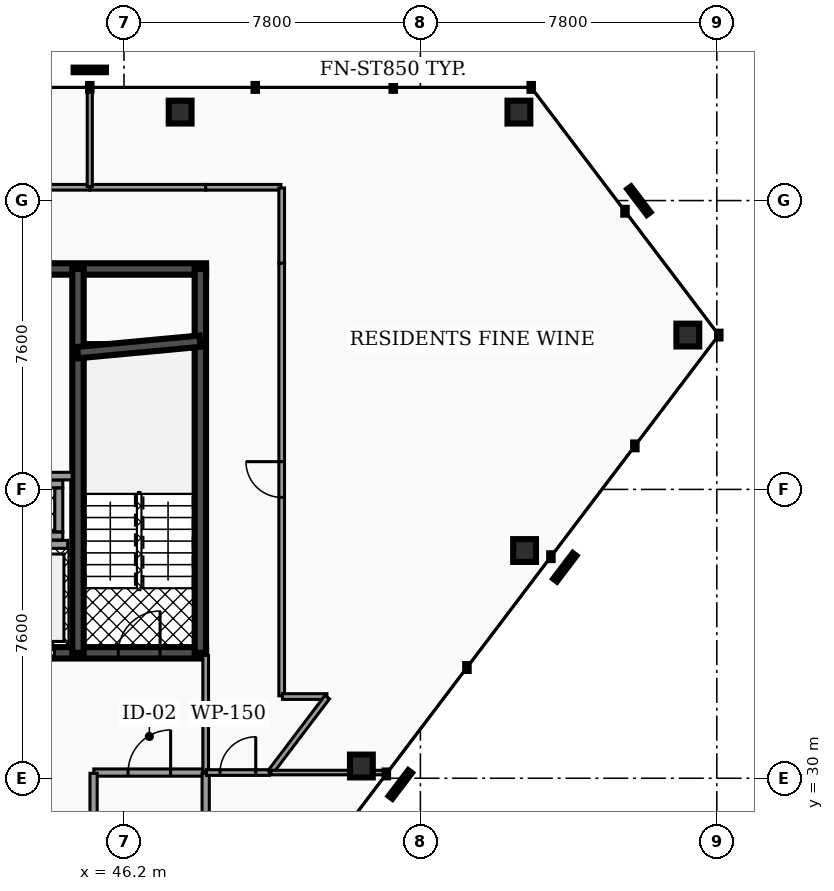
"""IFC4 building model, lengths in metres.
Left out: names, types, materials, properties, quantities, classifications, styles, units other than length and angle.
Written with IfcOpenShell. Run it as: python <this file> out.ifc"""

import sys

from ifc_helpers import new_model, si_unit, direction, frame, frame_2d, origin, origin_2d, place, context, subcontext, project, spatial, rectangle, hollow_rectangle, extrude, element, fill, save


model = new_model("IFC4")
c1 = context("Model", 3, precision=1e-05, world=origin(), true_north=direction((0.0, 1.0)))
c2 = subcontext(c1, "Body", "Model", "MODEL_VIEW")
j1 = project(units=[si_unit("LENGTHUNIT", "METRE"), si_unit("PLANEANGLEUNIT", "RADIAN")], contexts=[c1])
p1 = place(None, origin())
s1 = spatial("IfcSite", under=j1, at=p1, CompositionType="ELEMENT")
p2 = place(p1, origin())
s2 = spatial("IfcBuilding", under=s1, at=p2, CompositionType="ELEMENT")
p3 = place(p2, frame((0.0, 0.0, 229.16)))
s3 = spatial("IfcBuildingStorey", under=s2, at=p3, CompositionType="ELEMENT", Elevation=229.16)
p4 = place(p3, frame((28.5, 43.4, 0.0), z_axis=(0.0, 0.0, 1.0), x_axis=(1.0, 0.0, 0.0)))
e1 = element("IfcWall", 1, at=p4, inside=s3, PredefinedType="SHEAR", context=c2, shape_type="SweptSolid", body=[
    extrude(rectangle(XDim=19.86, YDim=0.3, at=frame_2d((9.93, 0.0))), origin(), (0.0, 0.0, 1.0), 3.18),
])
p5 = place(p3, frame((28.5, 33.3, 0.0), z_axis=(0.0, 0.0, 1.0), x_axis=(1.0, 0.0, 0.0)))
e2 = element("IfcWall", 2, at=p5, inside=s3, PredefinedType="SHEAR", context=c2, shape_type="SweptSolid", body=[
    extrude(rectangle(XDim=19.86, YDim=0.3, at=frame_2d((9.93, 0.0))), origin(), (0.0, 0.0, 1.0), 3.18),
])
p6 = place(p5, frame((3.93, 0.0, 0.0)))
e3 = element("IfcOpeningElement", 3, at=p6, cuts=e2, PredefinedType="OPENING", context=c2, shape_type="SweptSolid", body=[
    extrude(rectangle(XDim=1.1, YDim=2.15, at=frame_2d((0.55, 1.075))), frame((0.0, 0.16, 0.0), z_axis=(0.0, -1.0, 0.0), x_axis=(1.0, 0.0, 0.0)), (0.0, 0.0, 1.0), 0.32),
])
p7 = place(p5, frame((14.77, 0.0, 0.0)))
e4 = element("IfcOpeningElement", 4, at=p7, cuts=e2, PredefinedType="OPENING", context=c2, shape_type="SweptSolid", body=[
    extrude(rectangle(XDim=1.1, YDim=2.15, at=frame_2d((0.55, 1.075))), frame((0.0, 0.16, 0.0), z_axis=(0.0, -1.0, 0.0), x_axis=(1.0, 0.0, 0.0)), (0.0, 0.0, 1.0), 0.32),
])
p8 = place(p5, frame((11.25, 0.0, 0.0)))
e5 = element("IfcOpeningElement", 5, at=p8, cuts=e2, PredefinedType="OPENING", context=c2, shape_type="SweptSolid", body=[
    extrude(rectangle(XDim=1.0, YDim=2.1, at=frame_2d((0.5, 1.05))), frame((0.0, 0.16, 0.0), z_axis=(0.0, -1.0, 0.0), x_axis=(1.0, 0.0, 0.0)), (0.0, 0.0, 1.0), 0.32),
])
p9 = place(p5, frame((12.95, 0.0, 0.0)))
e6 = element("IfcOpeningElement", 6, at=p9, cuts=e2, PredefinedType="OPENING", context=c2, shape_type="SweptSolid", body=[
    extrude(rectangle(XDim=1.0, YDim=2.1, at=frame_2d((0.5, 1.05))), frame((0.0, 0.16, 0.0), z_axis=(0.0, -1.0, 0.0), x_axis=(1.0, 0.0, 0.0)), (0.0, 0.0, 1.0), 0.32),
])
p10 = place(p5, frame((5.85, 0.0, 0.0)))
e7 = element("IfcOpeningElement", 7, at=p10, cuts=e2, PredefinedType="OPENING", context=c2, shape_type="SweptSolid", body=[
    extrude(rectangle(XDim=1.0, YDim=2.1, at=frame_2d((0.5, 1.05))), frame((0.0, 0.16, 0.0), z_axis=(0.0, -1.0, 0.0), x_axis=(1.0, 0.0, 0.0)), (0.0, 0.0, 1.0), 0.32),
])
p11 = place(p5, frame((1.21, 0.0, 0.0)))
e8 = element("IfcOpeningElement", 8, at=p11, cuts=e2, PredefinedType="OPENING", context=c2, shape_type="SweptSolid", body=[
    extrude(rectangle(XDim=1.1, YDim=2.2, at=frame_2d((0.55, 1.1))), frame((0.0, 0.16, 0.0), z_axis=(0.0, -1.0, 0.0), x_axis=(1.0, 0.0, 0.0)), (0.0, 0.0, 1.0), 0.32),
])
p12 = place(p5, frame((9.34, 0.0, 0.0)))
e9 = element("IfcOpeningElement", 9, at=p12, cuts=e2, PredefinedType="OPENING", context=c2, shape_type="SweptSolid", body=[
    extrude(rectangle(XDim=1.12, YDim=2.05, at=frame_2d((0.56, 1.025))), frame((0.0, 0.16, 0.0), z_axis=(0.0, -1.0, 0.0), x_axis=(1.0, 0.0, 0.0)), (0.0, 0.0, 1.0), 0.32),
])
p13 = place(p5, frame((17.55, 0.0, 0.0)))
e10 = element("IfcOpeningElement", 10, at=p13, cuts=e2, PredefinedType="OPENING", context=c2, shape_type="SweptSolid", body=[
    extrude(rectangle(XDim=1.1, YDim=2.2, at=frame_2d((0.55, 1.1))), frame((0.0, 0.16, 0.0), z_axis=(0.0, -1.0, 0.0), x_axis=(1.0, 0.0, 0.0)), (0.0, 0.0, 1.0), 0.32),
])
for number, where, z_axis, x_axis in (
    (11, (44.99, 33.3, 0.0), (0.0, 0.0, 1.0), (0.0, 1.0, 0.0)),
    (12, (48.21, 33.3, 0.0), (0.0, 0.0, 1.0), (0.0, 1.0, 0.0)),
):
    element("IfcWall", number, at=place(p3, frame(where, z_axis=z_axis, x_axis=x_axis)), inside=s3, PredefinedType="SHEAR", context=c2, shape_type="SweptSolid", body=[
        extrude(rectangle(XDim=10.1, YDim=0.3, at=frame_2d((5.05, 0.0))), origin(), (0.0, 0.0, 1.0), 3.18),
    ])
p14 = place(p3, frame((44.98, 41.2, 0.0), z_axis=(0.0, 0.0, 1.0), x_axis=(0.995686468965, 0.09278176286, 0.0)))
e13 = element("IfcWall", 13, at=p14, inside=s3, PredefinedType="SHEAR", context=c2, shape_type="SweptSolid", body=[
    extrude(rectangle(XDim=3.234, YDim=0.3, at=frame_2d((1.617, 0.0))), origin(), (0.0, 0.0, 1.0), 3.18),
])
for number, where, z_axis, x_axis in (
    (14, (56.592, 47.528, 0.0), (0.0, 0.0, 1.0), (1.0, 0.0, 0.0)),
    (15, (47.678, 47.528, 0.0), (0.0, 0.0, 1.0), (1.0, 0.0, 0.0)),
    (16, (52.447, 30.323, 0.0), (0.0, 0.0, 1.0), (1.0, 0.0, 0.0)),
    (17, (56.742, 35.992, 0.0), (0.0, 0.0, 1.0), (1.0, 0.0, 0.0)),
    (18, (61.037, 41.661, 0.0), (0.0, 0.0, 1.0), (1.0, 0.0, 0.0)),
):
    element("IfcColumn", number, at=place(p3, frame(where, z_axis=z_axis, x_axis=x_axis)), inside=s3, PredefinedType="COLUMN", context=c2, shape_type="SweptSolid", body=[
        extrude(hollow_rectangle(XDim=0.6, YDim=0.6, WallThickness=0.03, at=origin_2d()), origin(), (0.0, 0.0, 1.0), 3.18),
    ])
p15 = place(p3, frame((42.92, 36.155, 0.0), z_axis=(0.0, 0.0, 1.0), x_axis=(1.0, 0.0, 0.0)))
e19 = element("IfcWall", 19, at=p15, inside=s3, PredefinedType="SOLIDWALL", context=c2, shape_type="SweptSolid", body=[
    extrude(rectangle(XDim=1.8, YDim=0.21, at=frame_2d((0.9, 0.0))), origin(), (0.0, 0.0, 1.0), 3.18),
])
for number, where, z_axis, x_axis in (
    (20, (42.99, 36.375, 0.0), (0.0, 0.0, 1.0), (1.0, 0.0, 0.0)),
    (21, (42.99, 37.745, 0.0), (0.0, 0.0, 1.0), (1.0, 0.0, 0.0)),
):
    element("IfcWall", number, at=place(p3, frame(where, z_axis=z_axis, x_axis=x_axis)), inside=s3, PredefinedType="SOLIDWALL", context=c2, shape_type="SweptSolid", body=[
        extrude(rectangle(XDim=1.6, YDim=0.21, at=frame_2d((0.8, 0.0))), origin(), (0.0, 0.0, 1.0), 3.18),
    ])
p16 = place(p3, frame((44.485, 36.485, 0.0), z_axis=(0.0, 0.0, 1.0), x_axis=(0.0, 1.0, 0.0)))
e22 = element("IfcWall", 22, at=p16, inside=s3, PredefinedType="SOLIDWALL", context=c2, shape_type="SweptSolid", body=[
    extrude(rectangle(XDim=1.15, YDim=0.21, at=frame_2d((0.575, 0.0))), origin(), (0.0, 0.0, 1.0), 3.18),
])
p17 = place(p3, frame((41.22, 37.95, 0.0), z_axis=(0.0, 0.0, 1.0), x_axis=(1.0, 0.0, 0.0)))
e23 = element("IfcWall", 23, at=p17, inside=s3, PredefinedType="PARTITIONING", context=c2, shape_type="SweptSolid", body=[
    extrude(rectangle(XDim=3.615, YDim=0.2, at=frame_2d((1.808, 0.0))), origin(), (0.0, 0.0, 1.0), 2.235),
])
p18 = place(p3, frame((45.405, 30.15, 0.0), z_axis=(0.0, 0.0, 1.0), x_axis=(1.0, 0.0, 0.0)))
e24 = element("IfcWall", 24, at=p18, inside=s3, PredefinedType="PARTITIONING", context=c2, shape_type="SweptSolid", body=[
    extrude(rectangle(XDim=2.925, YDim=0.19, at=frame_2d((1.462, 0.0))), origin(), (0.0, 0.0, 1.0), 2.235),
])
p19 = place(p18, frame((0.903, 0.0, 0.0)))
e25 = element("IfcOpeningElement", 25, at=p19, cuts=e24, PredefinedType="OPENING", context=c2, shape_type="SweptSolid", body=[
    extrude(rectangle(XDim=1.12, YDim=2.05, at=frame_2d((0.56, 1.025))), frame((0.0, 0.105, 0.0), z_axis=(0.0, -1.0, 0.0), x_axis=(1.0, 0.0, 0.0)), (0.0, 0.0, 1.0), 0.21),
])
p20 = place(p3, frame((48.35, 30.17, 0.0), z_axis=(0.0, 0.0, 1.0), x_axis=(0.0, 1.0, 0.0)))
e26 = element("IfcWall", 26, at=p20, inside=s3, PredefinedType="PARTITIONING", context=c2, shape_type="SweptSolid", body=[
    extrude(rectangle(XDim=3.06, YDim=0.15, at=frame_2d((1.53, 0.0))), origin(), (0.0, 0.0, 1.0), 2.235),
])
for number, where, z_axis, x_axis in (
    (27, (45.4, 27.37, 0.0), (0.0, 0.0, 1.0), (0.0, 1.0, 0.0)),
    (28, (48.35, 27.37, 0.0), (0.0, 0.0, 1.0), (0.0, 1.0, 0.0)),
):
    element("IfcWall", number, at=place(p3, frame(where, z_axis=z_axis, x_axis=x_axis)), inside=s3, PredefinedType="PARTITIONING", context=c2, shape_type="SweptSolid", body=[
        extrude(rectangle(XDim=2.76, YDim=0.19, at=frame_2d((1.38, 0.0))), origin(), (0.0, 0.0, 1.0), 2.235),
    ])
p21 = place(p3, frame((48.37, 30.15, 0.0), z_axis=(0.0, 0.0, 1.0), x_axis=(1.0, 0.0, 0.0)))
e29 = element("IfcWall", 29, at=p21, inside=s3, PredefinedType="PARTITIONING", context=c2, shape_type="SweptSolid", body=[
    extrude(rectangle(XDim=1.655, YDim=0.15, at=frame_2d((0.828, 0.0))), origin(), (0.0, 0.0, 1.0), 2.235),
])
p22 = place(p21, frame((0.358, 0.0, 0.0)))
e30 = element("IfcOpeningElement", 30, at=p22, cuts=e29, PredefinedType="OPENING", context=c2, shape_type="SweptSolid", body=[
    extrude(rectangle(XDim=0.94, YDim=2.05, at=frame_2d((0.47, 1.025))), frame((0.0, 0.085, 0.0), z_axis=(0.0, -1.0, 0.0), x_axis=(1.0, 0.0, 0.0)), (0.0, 0.0, 1.0), 0.17),
])
p23 = place(p3, frame((45.305, 45.55, 0.0), z_axis=(0.0, 0.0, 1.0), x_axis=(1.0, 0.0, 0.0)))
e31 = element("IfcWall", 31, at=p23, inside=s3, PredefinedType="PARTITIONING", context=c2, shape_type="SweptSolid", body=[
    extrude(rectangle(XDim=3.045, YDim=0.15, at=frame_2d((1.522, 0.0))), origin(), (0.0, 0.0, 1.0), 2.235),
])
for number, where, z_axis, x_axis in (
    (32, (48.35, 45.55, 0.0), (0.0, 0.0, 1.0), (1.0, 0.0, 0.0)),
    (33, (50.35, 43.55, 0.0), (0.0, 0.0, 1.0), (0.0, 1.0, 0.0)),
):
    element("IfcWall", number, at=place(p3, frame(where, z_axis=z_axis, x_axis=x_axis)), inside=s3, PredefinedType="PARTITIONING", context=c2, shape_type="SweptSolid", body=[
        extrude(rectangle(XDim=1.98, YDim=0.15, at=frame_2d((0.99, 0.0))), origin(), (0.0, 0.0, 1.0), 2.235),
    ])
p24 = place(p3, frame((50.35, 32.17, 0.0), z_axis=(0.0, 0.0, 1.0), x_axis=(0.0, 1.0, 0.0)))
e34 = element("IfcWall", 34, at=p24, inside=s3, PredefinedType="PARTITIONING", context=c2, shape_type="SweptSolid", body=[
    extrude(rectangle(XDim=11.38, YDim=0.15, at=frame_2d((5.69, 0.0))), origin(), (0.0, 0.0, 1.0), 2.235),
])
p25 = place(p24, frame((5.22, 0.0, 0.0)))
e35 = element("IfcOpeningElement", 35, at=p25, cuts=e34, PredefinedType="OPENING", context=c2, shape_type="SweptSolid", body=[
    extrude(rectangle(XDim=0.94, YDim=2.05, at=frame_2d((0.47, 1.025))), frame((0.0, 0.085, 0.0), z_axis=(0.0, -1.0, 0.0), x_axis=(1.0, 0.0, 0.0)), (0.0, 0.0, 1.0), 0.17),
])
p26 = place(p3, frame((50.37, 32.15, 0.0), z_axis=(0.0, 0.0, 1.0), x_axis=(1.0, 0.0, 0.0)))
e36 = element("IfcWall", 36, at=p26, inside=s3, PredefinedType="PARTITIONING", context=c2, shape_type="SweptSolid", body=[
    extrude(rectangle(XDim=1.17, YDim=0.15, at=frame_2d((0.585, 0.0))), origin(), (0.0, 0.0, 1.0), 2.235),
])
p27 = place(p3, frame((50.057, 30.166, 0.0), z_axis=(0.0, 0.0, 1.0), x_axis=(0.603869110647, 0.797083494502, 0.0)))
e37 = element("IfcWall", 37, at=p27, inside=s3, PredefinedType="PARTITIONING", context=c2, shape_type="SweptSolid", body=[
    extrude(rectangle(XDim=2.469, YDim=0.15, at=frame_2d((1.234, 0.0))), origin(), (0.0, 0.0, 1.0), 2.235),
])
p28 = place(p3, frame((40.779, 45.55, 0.0), z_axis=(0.0, 0.0, 1.0), x_axis=(1.0, 0.0, 0.0)))
e38 = element("IfcWall", 38, at=p28, inside=s3, PredefinedType="PARTITIONING", context=c2, shape_type="SweptSolid", body=[
    extrude(rectangle(XDim=4.516, YDim=0.15, at=frame_2d((2.258, 0.0))), origin(), (0.0, 0.0, 1.0), 2.235),
])
p29 = place(p3, frame((50.065, 30.15, 0.0), z_axis=(0.0, 0.0, 1.0), x_axis=(1.0, 0.0, 0.0)))
e39 = element("IfcWall", 39, at=p29, inside=s3, PredefinedType="PARTITIONING", context=c2, shape_type="SweptSolid", body=[
    extrude(rectangle(XDim=2.131, YDim=0.12, at=frame_2d((1.066, 0.0))), origin(), (0.0, 0.0, 1.0), 2.235),
])
p30 = place(p3, frame((52.404, 30.15, 0.0), z_axis=(0.0, 0.0, 1.0), x_axis=(1.0, 0.0, 0.0)))
e40 = element("IfcWall", 40, at=p30, inside=s3, PredefinedType="PARTITIONING", context=c2, shape_type="SweptSolid", body=[
    extrude(rectangle(XDim=0.713, YDim=0.12, at=frame_2d((0.356, 0.0))), origin(), (0.0, 0.0, 1.0), 2.235),
])
p31 = place(p3, frame((45.3, 45.57, 0.0), z_axis=(0.0, 0.0, 1.0), x_axis=(0.0, 1.0, 0.0)))
e41 = element("IfcWall", 41, at=p31, inside=s3, PredefinedType="PARTITIONING", context=c2, shape_type="SweptSolid", body=[
    extrude(rectangle(XDim=2.593, YDim=0.135, at=frame_2d((1.296, 0.0))), origin(), (0.0, 0.0, 1.0), 2.235),
])
p32 = place(p7, origin())
e42 = element("IfcDoor", 42, at=p32, inside=s3, OperationType="SLIDING_TO_RIGHT", PredefinedType="DOOR", context=c2, shape_type="SweptSolid", body=[
    extrude(rectangle(XDim=1.1, YDim=2.15, at=frame_2d((0.55, 1.075))), frame((0.0, 0.025, 0.0), z_axis=(0.0, -1.0, 0.0), x_axis=(1.0, 0.0, 0.0)), (0.0, 0.0, 1.0), 0.05),
])
fill(e4, e42)
p33 = place(p13, origin())
e43 = element("IfcDoor", 43, at=p33, inside=s3, OperationType="SINGLE_SWING_RIGHT", PredefinedType="DOOR", context=c2, shape_type="SweptSolid", body=[
    extrude(rectangle(XDim=1.1, YDim=2.2, at=frame_2d((0.55, 1.1))), frame((0.0, 0.025, 0.0), z_axis=(0.0, -1.0, 0.0), x_axis=(1.0, 0.0, 0.0)), (0.0, 0.0, 1.0), 0.05),
])
fill(e10, e43)
p34 = place(p19, origin())
e44 = element("IfcDoor", 44, at=p34, inside=s3, OperationType="SINGLE_SWING_RIGHT", PredefinedType="DOOR", context=c2, shape_type="SweptSolid", body=[
    extrude(rectangle(XDim=1.12, YDim=2.05, at=frame_2d((0.56, 1.025))), frame((0.0, 0.025, 0.0), z_axis=(0.0, -1.0, 0.0), x_axis=(1.0, 0.0, 0.0)), (0.0, 0.0, 1.0), 0.05),
])
fill(e25, e44)
p35 = place(p22, origin())
e45 = element("IfcDoor", 45, at=p35, inside=s3, OperationType="SINGLE_SWING_RIGHT", PredefinedType="DOOR", context=c2, shape_type="SweptSolid", body=[
    extrude(rectangle(XDim=0.94, YDim=2.05, at=frame_2d((0.47, 1.025))), frame((0.0, 0.025, 0.0), z_axis=(0.0, -1.0, 0.0), x_axis=(1.0, 0.0, 0.0)), (0.0, 0.0, 1.0), 0.05),
])
fill(e30, e45)
p36 = place(p25, origin())
e46 = element("IfcDoor", 46, at=p36, inside=s3, OperationType="SINGLE_SWING_RIGHT", PredefinedType="DOOR", context=c2, shape_type="SweptSolid", body=[
    extrude(rectangle(XDim=0.94, YDim=2.05, at=frame_2d((0.47, 1.025))), frame((0.0, 0.025, 0.0), z_axis=(0.0, -1.0, 0.0), x_axis=(1.0, 0.0, 0.0)), (0.0, 0.0, 1.0), 0.05),
])
fill(e35, e46)
save(model, sys.argv[1])
